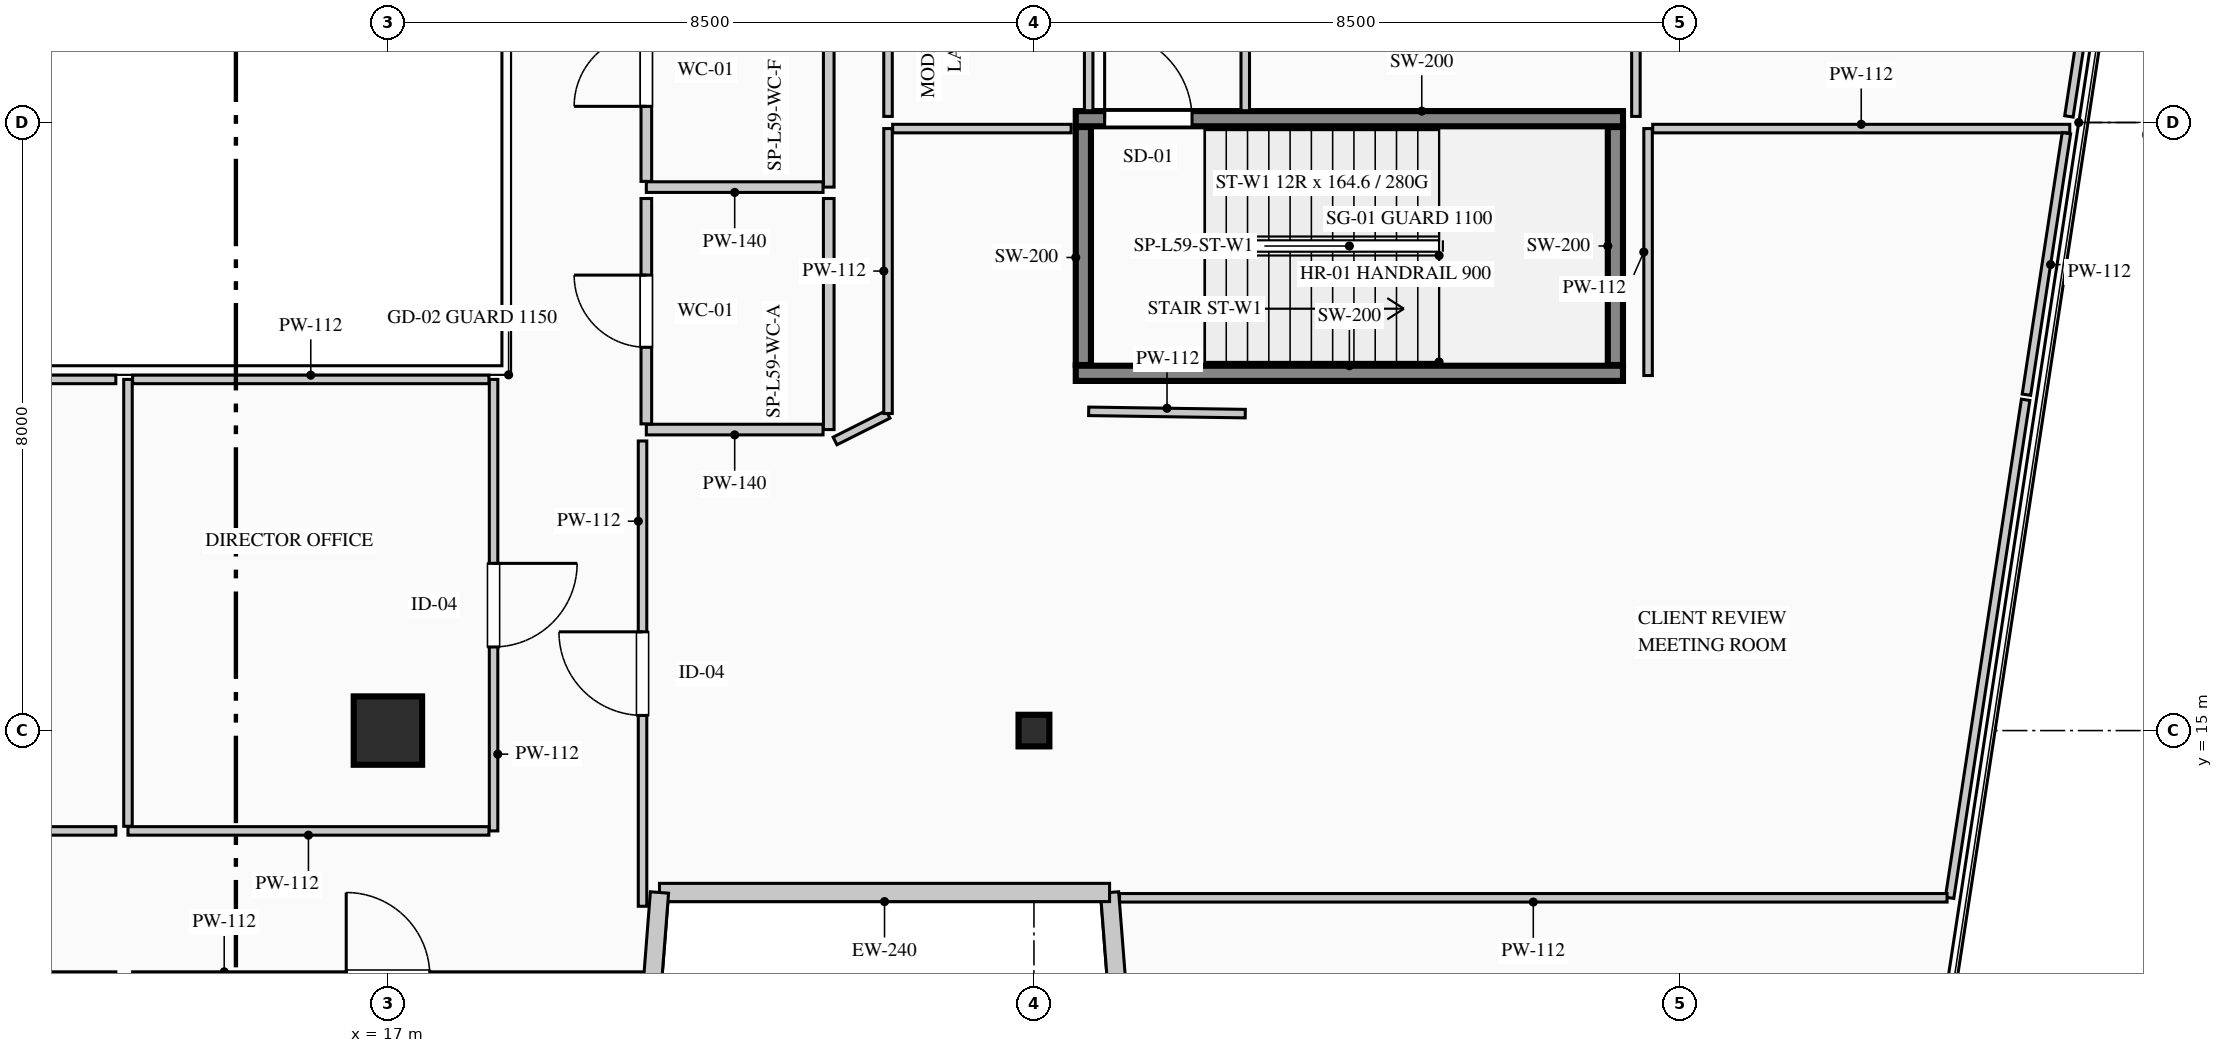
"""IFC4 building model, lengths in metres.
Left out: names, types, materials, properties, quantities, classifications, styles, units other than length and angle.
Written with IfcOpenShell. Run it as: python <this file> out.ifc"""

import sys

from ifc_helpers import new_model, si_unit, direction, frame, frame_2d, origin, origin_2d, place, context, subcontext, project, spatial, rectangle, i_section, extrude, element, fill, save


model = new_model("IFC4")
c1 = context("Model", 3, precision=1e-05, world=origin(), true_north=direction((0.0, 1.0)))
c2 = subcontext(c1, "Body", "Model", "MODEL_VIEW")
j1 = project(units=[si_unit("LENGTHUNIT", "METRE"), si_unit("PLANEANGLEUNIT", "RADIAN")], contexts=[c1])
p1 = place(None, origin())
s1 = spatial("IfcSite", under=j1, at=p1, CompositionType="ELEMENT")
p2 = place(p1, origin())
s2 = spatial("IfcBuilding", under=s1, at=p2, CompositionType="ELEMENT")
p3 = place(p2, frame((0.0, 0.0, 246.95)))
s3 = spatial("IfcBuildingStorey", under=s2, at=p3, CompositionType="ELEMENT", Elevation=246.95)
p4 = place(p3, frame((26.05, 19.7, 0.0), z_axis=(0.0, 0.0, 1.0), x_axis=(1.0, 0.0, 0.0)))
e1 = element("IfcWall", 1, at=p4, inside=s3, PredefinedType="SHEAR", context=c2, shape_type="SweptSolid", body=[
    extrude(rectangle(XDim=7.2, YDim=0.2, at=frame_2d((3.6, 0.0))), origin(), (0.0, 0.0, 1.0), 3.95),
])
p5 = place(p3, frame((26.05, 23.05, 0.0), z_axis=(0.0, 0.0, 1.0), x_axis=(1.0, 0.0, 0.0)))
e2 = element("IfcWall", 2, at=p5, inside=s3, PredefinedType="SHEAR", context=c2, shape_type="SweptSolid", body=[
    extrude(rectangle(XDim=7.2, YDim=0.2, at=frame_2d((3.6, 0.0))), origin(), (0.0, 0.0, 1.0), 3.95),
])
p6 = place(p5, frame((0.38, 0.0, 0.0)))
e3 = element("IfcOpeningElement", 3, at=p6, cuts=e2, PredefinedType="OPENING", context=c2, shape_type="SweptSolid", body=[
    extrude(rectangle(XDim=1.15, YDim=2.2, at=frame_2d((0.575, 1.1))), frame((0.0, 0.11, 0.0), z_axis=(0.0, -1.0, 0.0), x_axis=(1.0, 0.0, 0.0)), (0.0, 0.0, 1.0), 0.22),
])
for number, where, z_axis, x_axis in (
    (4, (26.15, 19.81, 0.0), (0.0, 0.0, 1.0), (0.0, 1.0, 0.0)),
    (5, (33.15, 19.81, 0.0), (0.0, 0.0, 1.0), (0.0, 1.0, 0.0)),
):
    element("IfcWall", number, at=place(p3, frame(where, z_axis=z_axis, x_axis=x_axis)), inside=s3, PredefinedType="SHEAR", context=c2, shape_type="SweptSolid", body=[
        extrude(rectangle(XDim=3.13, YDim=0.2, at=frame_2d((1.565, 0.0))), origin(), (0.0, 0.0, 1.0), 3.95),
    ])
p7 = place(p3, frame((17.0, 15.0, 0.0), z_axis=(0.0, 0.0, 1.0), x_axis=(1.0, 0.0, 0.0)))
e6 = element("IfcColumn", 6, at=p7, inside=s3, PredefinedType="COLUMN", context=c2, shape_type="SweptSolid", body=[
    extrude(rectangle(XDim=0.9, YDim=0.9, at=origin_2d()), origin(), (0.0, 0.0, 1.0), 3.95),
])
p8 = place(p3, frame((25.5, 15.0, 0.0), z_axis=(0.0, 0.0, 1.0), x_axis=(1.0, 0.0, 0.0)))
e7 = element("IfcColumn", 7, at=p8, inside=s3, PredefinedType="COLUMN", context=c2, shape_type="SweptSolid", body=[
    extrude(i_section(OverallWidth=0.406, OverallDepth=0.416, WebThickness=0.03, FlangeThickness=0.048, FilletRadius=0.015, at=origin_2d()), origin(), (0.0, 0.0, 1.0), 3.95),
])
p9 = place(p3, frame((27.295, 2.62, 0.0), z_axis=(0.0, 0.0, 1.0), x_axis=(-0.077793257511, 0.996969512616, 0.0)))
e8 = element("IfcWall", 8, at=p9, inside=s3, PredefinedType="STANDARD", context=c2, shape_type="SweptSolid", body=[
    extrude(rectangle(XDim=10.281, YDim=0.24, at=frame_2d((5.141, 0.0))), origin(), (0.0, 0.0, 1.0), 3.6),
])
p10 = place(p9, frame((5.755, 0.0, 0.9)))
e9 = element("IfcOpeningElement", 9, at=p10, cuts=e8, PredefinedType="OPENING", context=c2, shape_type="SweptSolid", body=[
    extrude(rectangle(XDim=1.65, YDim=1.95, at=frame_2d((0.825, 0.975))), frame((0.0, 0.13, 0.0), z_axis=(0.0, -1.0, 0.0), x_axis=(1.0, 0.0, 0.0)), (0.0, 0.0, 1.0), 0.26),
])
p11 = place(p3, frame((26.495, 12.87, 0.0), z_axis=(0.0, 0.0, 1.0), x_axis=(-1.0, 0.0, 0.0)))
e10 = element("IfcWall", 10, at=p11, inside=s3, PredefinedType="STANDARD", context=c2, shape_type="SweptSolid", body=[
    extrude(rectangle(XDim=5.922, YDim=0.24, at=frame_2d((2.961, 0.0))), origin(), (0.0, 0.0, 1.0), 3.6),
])
p12 = place(p3, frame((20.573, 12.87, 0.0), z_axis=(0.0, 0.0, 1.0), x_axis=(-0.077816860153, -0.996967670627, 0.0)))
e11 = element("IfcWall", 11, at=p12, inside=s3, PredefinedType="STANDARD", context=c2, shape_type="SweptSolid", body=[
    extrude(rectangle(XDim=10.281, YDim=0.24, at=frame_2d((5.141, 0.0))), origin(), (0.0, 0.0, 1.0), 3.6),
])
p13 = place(p12, frame((2.876, 0.0, 0.9)))
e12 = element("IfcOpeningElement", 12, at=p13, cuts=e11, PredefinedType="OPENING", context=c2, shape_type="SweptSolid", body=[
    extrude(rectangle(XDim=1.65, YDim=1.95, at=frame_2d((0.825, 0.975))), frame((0.0, 0.13, 0.0), z_axis=(0.0, -1.0, 0.0), x_axis=(1.0, 0.0, 0.0)), (0.0, 0.0, 1.0), 0.26),
])
p14 = place(p3, frame((22.8, 25.15, 0.0), z_axis=(0.0, 0.0, 1.0), x_axis=(0.0, -1.0, 0.0)))
e13 = element("IfcWall", 13, at=p14, inside=s3, PredefinedType="PARTITIONING", context=c2, shape_type="SweptSolid", body=[
    extrude(rectangle(XDim=3.0, YDim=0.14, at=frame_2d((1.5, 0.0))), origin(), (0.0, 0.0, 1.0), 3.285),
])
p15 = place(p3, frame((22.725, 22.15, 0.0), z_axis=(0.0, 0.0, 1.0), x_axis=(-1.0, 0.0, 0.0)))
e14 = element("IfcWall", 14, at=p15, inside=s3, PredefinedType="PARTITIONING", context=c2, shape_type="SweptSolid", body=[
    extrude(rectangle(XDim=2.325, YDim=0.14, at=frame_2d((1.163, 0.0))), origin(), (0.0, 0.0, 1.0), 3.6),
])
p16 = place(p3, frame((20.4, 22.225, 0.0), z_axis=(0.0, 0.0, 1.0), x_axis=(0.0, 1.0, 0.0)))
e15 = element("IfcWall", 15, at=p16, inside=s3, PredefinedType="PARTITIONING", context=c2, shape_type="SweptSolid", body=[
    extrude(rectangle(XDim=2.925, YDim=0.14, at=frame_2d((1.462, 0.0))), origin(), (0.0, 0.0, 1.0), 3.6),
])
p17 = place(p16, frame((0.988, 0.0, 0.0)))
e16 = element("IfcOpeningElement", 16, at=p17, cuts=e15, PredefinedType="OPENING", context=c2, shape_type="SweptSolid", body=[
    extrude(rectangle(XDim=0.95, YDim=2.15, at=frame_2d((0.475, 1.075))), frame((0.0, 0.08, 0.0), z_axis=(0.0, -1.0, 0.0), x_axis=(1.0, 0.0, 0.0)), (0.0, 0.0, 1.0), 0.16),
])
p18 = place(p3, frame((22.8, 22.0, 0.0), z_axis=(0.0, 0.0, 1.0), x_axis=(0.0, -1.0, 0.0)))
e17 = element("IfcWall", 17, at=p18, inside=s3, PredefinedType="PARTITIONING", context=c2, shape_type="SweptSolid", body=[
    extrude(rectangle(XDim=3.04, YDim=0.14, at=frame_2d((1.52, 0.0))), origin(), (0.0, 0.0, 1.0), 3.285),
])
p19 = place(p3, frame((22.725, 18.96, 0.0), z_axis=(0.0, 0.0, 1.0), x_axis=(-1.0, 0.0, 0.0)))
e18 = element("IfcWall", 18, at=p19, inside=s3, PredefinedType="PARTITIONING", context=c2, shape_type="SweptSolid", body=[
    extrude(rectangle(XDim=2.325, YDim=0.14, at=frame_2d((1.163, 0.0))), origin(), (0.0, 0.0, 1.0), 3.6),
])
p20 = place(p3, frame((20.4, 19.035, 0.0), z_axis=(0.0, 0.0, 1.0), x_axis=(0.0, 1.0, 0.0)))
e19 = element("IfcWall", 19, at=p20, inside=s3, PredefinedType="PARTITIONING", context=c2, shape_type="SweptSolid", body=[
    extrude(rectangle(XDim=2.965, YDim=0.14, at=frame_2d((1.482, 0.0))), origin(), (0.0, 0.0, 1.0), 3.6),
])
p21 = place(p20, frame((1.008, 0.0, 0.0)))
e20 = element("IfcOpeningElement", 20, at=p21, cuts=e19, PredefinedType="OPENING", context=c2, shape_type="SweptSolid", body=[
    extrude(rectangle(XDim=0.95, YDim=2.15, at=frame_2d((0.475, 1.075))), frame((0.0, 0.08, 0.0), z_axis=(0.0, -1.0, 0.0), x_axis=(1.0, 0.0, 0.0)), (0.0, 0.0, 1.0), 0.16),
])
p22 = place(p3, frame((13.641, 11.77, 0.0), z_axis=(0.0, 0.0, 1.0), x_axis=(1.0, 0.0, 0.0)))
e21 = element("IfcWall", 21, at=p22, inside=s3, PredefinedType="PARTITIONING", context=c2, shape_type="SweptSolid", body=[
    extrude(rectangle(XDim=6.721, YDim=0.112, at=frame_2d((3.36, 0.0))), origin(), (0.0, 0.0, 1.0), 3.6),
])
p23 = place(p22, frame((2.81, 0.0, 0.0)))
e22 = element("IfcOpeningElement", 22, at=p23, cuts=e21, PredefinedType="OPENING", context=c2, shape_type="SweptSolid", body=[
    extrude(rectangle(XDim=1.1, YDim=2.2, at=frame_2d((0.55, 1.1))), frame((0.0, 0.066, 0.0), z_axis=(0.0, -1.0, 0.0), x_axis=(1.0, 0.0, 0.0)), (0.0, 0.0, 1.0), 0.132),
])
p24 = place(p3, frame((6.257, 11.77, 0.0), z_axis=(0.0, 0.0, 1.0), x_axis=(1.0, 0.0, 0.0)))
e23 = element("IfcWall", 23, at=p24, inside=s3, PredefinedType="PARTITIONING", context=c2, shape_type="SweptSolid", body=[
    extrude(rectangle(XDim=7.163, YDim=0.112, at=frame_2d((3.582, 0.0))), origin(), (0.0, 0.0, 1.0), 3.6),
])
p25 = place(p24, frame((3.031, 0.0, 0.0)))
e24 = element("IfcOpeningElement", 24, at=p25, cuts=e23, PredefinedType="OPENING", context=c2, shape_type="SweptSolid", body=[
    extrude(rectangle(XDim=1.1, YDim=2.2, at=frame_2d((0.55, 1.1))), frame((0.0, 0.066, 0.0), z_axis=(0.0, -1.0, 0.0), x_axis=(1.0, 0.0, 0.0)), (0.0, 0.0, 1.0), 0.132),
])
p26 = place(p3, frame((18.39, 19.62, 0.0), z_axis=(0.0, 0.0, 1.0), x_axis=(0.0, -1.0, 0.0)))
e25 = element("IfcWall", 25, at=p26, inside=s3, PredefinedType="PARTITIONING", context=c2, shape_type="SweptSolid", body=[
    extrude(rectangle(XDim=5.94, YDim=0.112, at=frame_2d((2.97, 0.0))), origin(), (0.0, 0.0, 1.0), 3.6),
])
p27 = place(p26, frame((2.42, 0.0, 0.0)))
e26 = element("IfcOpeningElement", 26, at=p27, cuts=e25, PredefinedType="OPENING", context=c2, shape_type="SweptSolid", body=[
    extrude(rectangle(XDim=1.1, YDim=2.2, at=frame_2d((0.55, 1.1))), frame((0.0, 0.066, 0.0), z_axis=(0.0, -1.0, 0.0), x_axis=(1.0, 0.0, 0.0)), (0.0, 0.0, 1.0), 0.132),
])
p28 = place(p3, frame((18.329, 13.68, 0.0), z_axis=(0.0, 0.0, 1.0), x_axis=(-1.0, 0.0, 0.0)))
e27 = element("IfcWall", 27, at=p28, inside=s3, PredefinedType="PARTITIONING", context=c2, shape_type="SweptSolid", body=[
    extrude(rectangle(XDim=4.749, YDim=0.112, at=frame_2d((2.375, 0.0))), origin(), (0.0, 0.0, 1.0), 3.6),
])
p29 = place(p3, frame((13.58, 13.741, 0.0), z_axis=(0.0, 0.0, 1.0), x_axis=(0.0, 1.0, 0.0)))
e28 = element("IfcWall", 28, at=p29, inside=s3, PredefinedType="PARTITIONING", context=c2, shape_type="SweptSolid", body=[
    extrude(rectangle(XDim=5.879, YDim=0.112, at=frame_2d((2.939, 0.0))), origin(), (0.0, 0.0, 1.0), 3.6),
])
p30 = place(p3, frame((13.641, 19.62, 0.0), z_axis=(0.0, 0.0, 1.0), x_axis=(1.0, 0.0, 0.0)))
e29 = element("IfcWall", 29, at=p30, inside=s3, PredefinedType="PARTITIONING", context=c2, shape_type="SweptSolid", body=[
    extrude(rectangle(XDim=4.688, YDim=0.112, at=frame_2d((2.344, 0.0))), origin(), (0.0, 0.0, 1.0), 3.6),
])
p31 = place(p3, frame((33.58, 19.671, 0.0), z_axis=(0.0, 0.0, 1.0), x_axis=(0.0, 1.0, 0.0)))
e30 = element("IfcWall", 30, at=p31, inside=s3, PredefinedType="PARTITIONING", context=c2, shape_type="SweptSolid", body=[
    extrude(rectangle(XDim=3.249, YDim=0.112, at=frame_2d((1.625, 0.0))), origin(), (0.0, 0.0, 1.0), 3.6),
])
p32 = place(p3, frame((33.641, 22.92, 0.0), z_axis=(0.0, 0.0, 1.0), x_axis=(1.0, 0.0, 0.0)))
e31 = element("IfcWall", 31, at=p32, inside=s3, PredefinedType="PARTITIONING", context=c2, shape_type="SweptSolid", body=[
    extrude(rectangle(XDim=5.487, YDim=0.112, at=frame_2d((2.744, 0.0))), origin(), (0.0, 0.0, 1.0), 3.6),
])
p33 = place(p3, frame((39.084, 22.859, 0.0), z_axis=(0.0, 0.0, 1.0), x_axis=(-0.151050155671, -0.988526100046, 0.0)))
e32 = element("IfcWall", 32, at=p33, inside=s3, PredefinedType="PARTITIONING", context=c2, shape_type="SweptSolid", body=[
    extrude(rectangle(XDim=3.48, YDim=0.112, at=frame_2d((1.74, 0.0))), origin(), (0.0, 0.0, 1.0), 3.6),
])
p34 = place(p3, frame((38.548, 19.352, 0.0), z_axis=(0.0, 0.0, 1.0), x_axis=(-0.150955405806, -0.988540573501, 0.0)))
e33 = element("IfcWall", 33, at=p34, inside=s3, PredefinedType="PARTITIONING", context=c2, shape_type="SweptSolid", body=[
    extrude(rectangle(XDim=6.628, YDim=0.112, at=frame_2d((3.314, 0.0))), origin(), (0.0, 0.0, 1.0), 3.6),
])
p35 = place(p3, frame((37.514, 12.8, 0.0), z_axis=(0.0, 0.0, 1.0), x_axis=(-1.0, 0.0, 0.0)))
e34 = element("IfcWall", 34, at=p35, inside=s3, PredefinedType="PARTITIONING", context=c2, shape_type="SweptSolid", body=[
    extrude(rectangle(XDim=10.888, YDim=0.112, at=frame_2d((5.444, 0.0))), origin(), (0.0, 0.0, 1.0), 3.6),
])
p36 = place(p3, frame((20.35, 12.689, 0.0), z_axis=(0.0, 0.0, 1.0), x_axis=(0.0, 1.0, 0.0)))
e35 = element("IfcWall", 35, at=p36, inside=s3, PredefinedType="PARTITIONING", context=c2, shape_type="SweptSolid", body=[
    extrude(rectangle(XDim=6.121, YDim=0.112, at=frame_2d((3.061, 0.0))), origin(), (0.0, 0.0, 1.0), 3.6),
])
p37 = place(p36, frame((2.511, 0.0, 0.0)))
e36 = element("IfcOpeningElement", 36, at=p37, cuts=e35, PredefinedType="OPENING", context=c2, shape_type="SweptSolid", body=[
    extrude(rectangle(XDim=1.1, YDim=2.2, at=frame_2d((0.55, 1.1))), frame((0.0, 0.066, 0.0), z_axis=(0.0, -1.0, 0.0), x_axis=(1.0, 0.0, 0.0)), (0.0, 0.0, 1.0), 0.132),
])
p38 = place(p3, frame((22.883, 18.81, 0.0), z_axis=(0.0, 0.0, 1.0), x_axis=(0.893737436086, 0.448590453909, 0.0)))
e37 = element("IfcWall", 37, at=p38, inside=s3, PredefinedType="PARTITIONING", context=c2, shape_type="SweptSolid", body=[
    extrude(rectangle(XDim=0.78, YDim=0.112, at=frame_2d((0.39, 0.0))), origin(), (0.0, 0.0, 1.0), 3.6),
])
p39 = place(p3, frame((23.58, 19.171, 0.0), z_axis=(0.0, 0.0, 1.0), x_axis=(0.0, 1.0, 0.0)))
e38 = element("IfcWall", 38, at=p39, inside=s3, PredefinedType="PARTITIONING", context=c2, shape_type="SweptSolid", body=[
    extrude(rectangle(XDim=3.749, YDim=0.112, at=frame_2d((1.875, 0.0))), origin(), (0.0, 0.0, 1.0), 3.6),
])
p40 = place(p3, frame((23.641, 22.92, 0.0), z_axis=(0.0, 0.0, 1.0), x_axis=(1.0, 0.0, 0.0)))
e39 = element("IfcWall", 39, at=p40, inside=s3, PredefinedType="PARTITIONING", context=c2, shape_type="SweptSolid", body=[
    extrude(rectangle(XDim=2.348, YDim=0.112, at=frame_2d((1.174, 0.0))), origin(), (0.0, 0.0, 1.0), 3.6),
])
p41 = place(p3, frame((26.22, 19.2, 0.0), z_axis=(0.0, 0.0, 1.0), x_axis=(0.999893773718, -0.014575365509, 0.0)))
e40 = element("IfcWall", 40, at=p41, inside=s3, PredefinedType="PARTITIONING", context=c2, shape_type="SweptSolid", body=[
    extrude(rectangle(XDim=2.06, YDim=0.112, at=frame_2d((1.03, 0.0))), origin(), (0.0, 0.0, 1.0), 3.6),
])
p42 = place(p3, frame((9.35, 19.62, 0.0), z_axis=(0.0, 0.0, 1.0), x_axis=(1.0, 0.0, 0.0)))
e41 = element("IfcWall", 41, at=p42, inside=s3, PredefinedType="PARTITIONING", context=c2, shape_type="SweptSolid", body=[
    extrude(rectangle(XDim=4.07, YDim=0.112, at=frame_2d((2.035, 0.0))), origin(), (0.0, 0.0, 1.0), 3.6),
])
p43 = place(p3, frame((13.42, 13.68, 0.0), z_axis=(0.0, 0.0, 1.0), x_axis=(-1.0, 0.0, 0.0)))
e42 = element("IfcWall", 42, at=p43, inside=s3, PredefinedType="PARTITIONING", context=c2, shape_type="SweptSolid", body=[
    extrude(rectangle(XDim=7.374, YDim=0.112, at=frame_2d((3.687, 0.0))), origin(), (0.0, 0.0, 1.0), 3.6),
])
p44 = place(p3, frame((23.58, 23.08, 0.0), z_axis=(0.0, 0.0, 1.0), x_axis=(0.0, 1.0, 0.0)))
e43 = element("IfcWall", 43, at=p44, inside=s3, PredefinedType="PARTITIONING", context=c2, shape_type="SweptSolid", body=[
    extrude(rectangle(XDim=5.94, YDim=0.112, at=frame_2d((2.97, 0.0))), origin(), (0.0, 0.0, 1.0), 3.6),
])
p45 = place(p3, frame((26.22, 28.959, 0.0), z_axis=(0.0, 0.0, 1.0), x_axis=(0.0, -1.0, 0.0)))
e44 = element("IfcWall", 44, at=p45, inside=s3, PredefinedType="PARTITIONING", context=c2, shape_type="SweptSolid", body=[
    extrude(rectangle(XDim=5.804, YDim=0.112, at=frame_2d((2.902, 0.0))), origin(), (0.0, 0.0, 1.0), 3.6),
])
p46 = place(p45, frame((2.352, 0.0, 0.0)))
e45 = element("IfcOpeningElement", 45, at=p46, cuts=e44, PredefinedType="OPENING", context=c2, shape_type="SweptSolid", body=[
    extrude(rectangle(XDim=1.1, YDim=2.2, at=frame_2d((0.55, 1.1))), frame((0.0, 0.066, 0.0), z_axis=(0.0, -1.0, 0.0), x_axis=(1.0, 0.0, 0.0)), (0.0, 0.0, 1.0), 0.132),
])
p47 = place(p3, frame((28.28, 23.155, 0.0), z_axis=(0.0, 0.0, 1.0), x_axis=(0.0, 1.0, 0.0)))
e46 = element("IfcWall", 46, at=p47, inside=s3, PredefinedType="PARTITIONING", context=c2, shape_type="SweptSolid", body=[
    extrude(rectangle(XDim=5.865, YDim=0.112, at=frame_2d((2.933, 0.0))), origin(), (0.0, 0.0, 1.0), 3.6),
])
p48 = place(p47, frame((2.383, 0.0, 0.0)))
e47 = element("IfcOpeningElement", 47, at=p48, cuts=e46, PredefinedType="OPENING", context=c2, shape_type="SweptSolid", body=[
    extrude(rectangle(XDim=1.1, YDim=2.2, at=frame_2d((0.55, 1.1))), frame((0.0, 0.066, 0.0), z_axis=(0.0, -1.0, 0.0), x_axis=(1.0, 0.0, 0.0)), (0.0, 0.0, 1.0), 0.132),
])
p49 = place(p3, frame((33.42, 28.959, 0.0), z_axis=(0.0, 0.0, 1.0), x_axis=(0.0, -1.0, 0.0)))
e48 = element("IfcWall", 48, at=p49, inside=s3, PredefinedType="PARTITIONING", context=c2, shape_type="SweptSolid", body=[
    extrude(rectangle(XDim=5.879, YDim=0.112, at=frame_2d((2.939, 0.0))), origin(), (0.0, 0.0, 1.0), 3.6),
])
p50 = place(p3, frame((41.529, 38.867, 0.0), z_axis=(0.0, 0.0, 1.0), x_axis=(-0.151041582551, -0.98852741001, 0.0)))
e49 = element("IfcWall", 49, at=p50, inside=s3, PredefinedType="PARTITIONING", context=c2, shape_type="SweptSolid", body=[
    extrude(rectangle(XDim=15.97, YDim=0.112, at=frame_2d((7.985, 0.0))), origin(), (0.0, 0.0, 1.0), 3.6),
])
p51 = place(p6, origin())
e50 = element("IfcDoor", 50, at=p51, inside=s3, OperationType="SINGLE_SWING_LEFT", PredefinedType="DOOR", context=c2, shape_type="SweptSolid", body=[
    extrude(rectangle(XDim=1.15, YDim=2.2, at=frame_2d((0.575, 1.1))), frame((0.0, 0.025, 0.0), z_axis=(0.0, -1.0, 0.0), x_axis=(1.0, 0.0, 0.0)), (0.0, 0.0, 1.0), 0.05),
])
fill(e3, e50)
p52 = place(p17, origin())
e51 = element("IfcDoor", 51, at=p52, inside=s3, OperationType="SINGLE_SWING_LEFT", PredefinedType="DOOR", context=c2, shape_type="SweptSolid", body=[
    extrude(rectangle(XDim=0.95, YDim=2.15, at=frame_2d((0.475, 1.075))), frame((0.0, 0.025, 0.0), z_axis=(0.0, -1.0, 0.0), x_axis=(1.0, 0.0, 0.0)), (0.0, 0.0, 1.0), 0.05),
])
fill(e16, e51)
p53 = place(p21, origin())
e52 = element("IfcDoor", 52, at=p53, inside=s3, OperationType="SINGLE_SWING_RIGHT", PredefinedType="DOOR", context=c2, shape_type="SweptSolid", body=[
    extrude(rectangle(XDim=0.95, YDim=2.15, at=frame_2d((0.475, 1.075))), frame((0.0, 0.025, 0.0), z_axis=(0.0, -1.0, 0.0), x_axis=(1.0, 0.0, 0.0)), (0.0, 0.0, 1.0), 0.05),
])
fill(e20, e52)
p54 = place(p27, origin())
e53 = element("IfcDoor", 53, at=p54, inside=s3, OperationType="SINGLE_SWING_LEFT", PredefinedType="DOOR", context=c2, shape_type="SweptSolid", body=[
    extrude(rectangle(XDim=1.1, YDim=2.2, at=frame_2d((0.55, 1.1))), frame((0.0, 0.025, 0.0), z_axis=(0.0, -1.0, 0.0), x_axis=(1.0, 0.0, 0.0)), (0.0, 0.0, 1.0), 0.05),
])
fill(e26, e53)
p55 = place(p37, origin())
e54 = element("IfcDoor", 54, at=p55, inside=s3, OperationType="SINGLE_SWING_RIGHT", PredefinedType="DOOR", context=c2, shape_type="SweptSolid", body=[
    extrude(rectangle(XDim=1.1, YDim=2.2, at=frame_2d((0.55, 1.1))), frame((0.0, 0.025, 0.0), z_axis=(0.0, -1.0, 0.0), x_axis=(1.0, 0.0, 0.0)), (0.0, 0.0, 1.0), 0.05),
])
fill(e36, e54)
save(model, sys.argv[1])
